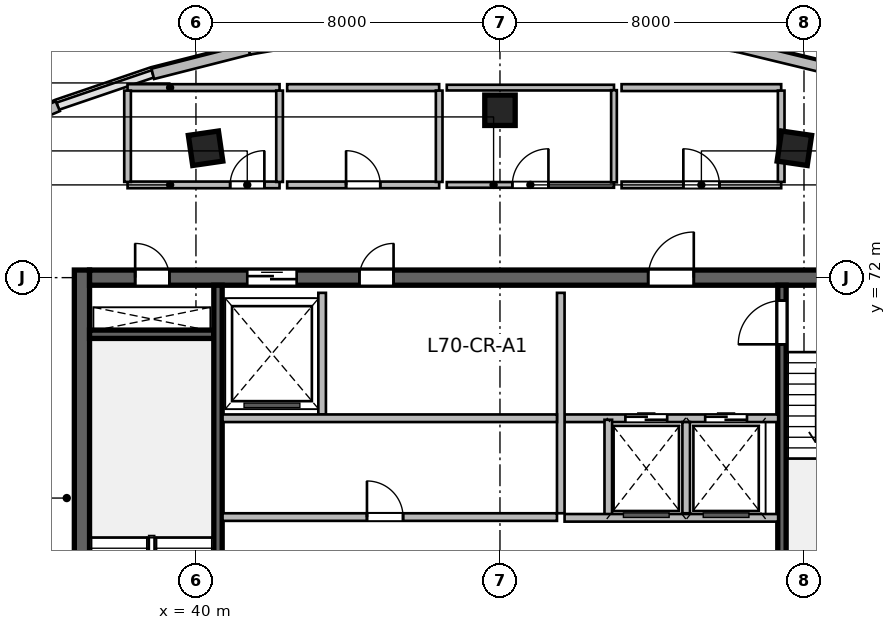
"""IFC4 building model, lengths in metres.
Left out: names, types, materials, properties, quantities, classifications, styles, units other than length and angle.
Written with IfcOpenShell. Run it as: python <this file> out.ifc"""

import sys

from ifc_helpers import new_model, si_unit, direction, frame, frame_2d, origin, origin_2d, place, context, subcontext, project, spatial, rectangle, extrude, source, transform, mapped, element, fill, save


model = new_model("IFC4")
c1 = context("Model", 3, precision=1e-05, world=origin(), true_north=direction((0.0, 1.0)))
c2 = subcontext(c1, "Body", "Model", "MODEL_VIEW")
j1 = project(units=[si_unit("LENGTHUNIT", "METRE"), si_unit("PLANEANGLEUNIT", "RADIAN")], contexts=[c1])
p1 = place(None, origin())
s1 = spatial("IfcSite", under=j1, at=p1, CompositionType="ELEMENT")
p2 = place(p1, origin())
s2 = spatial("IfcBuilding", under=s1, at=p2, CompositionType="ELEMENT")
p3 = place(p2, frame((0.0, 0.0, 287.4)))
s3 = spatial("IfcBuildingStorey", under=s2, at=p3, CompositionType="ELEMENT", Elevation=287.4)
m1 = source(origin(), c2, "Body", "SweptSolid", [
    extrude(rectangle(XDim=12.0, YDim=0.4, at=frame_2d((6.0, 0.0))), origin(), (0.0, 0.0, 1.0), 3.9),
])
p4 = place(p3, frame((37.0, 60.2, 0.0), z_axis=(0.0, 0.0, 1.0), x_axis=(0.0, 1.0, 0.0)))
e1 = element("IfcWall", 1, at=p4, inside=s3, PredefinedType="SHEAR", context=c2, shape_type="MappedRepresentation", body=[
    mapped(m1, transform((0.0, 0.0, 0.0), scale=1.0)),
])
m2 = source(origin(), c2, "Body", "SweptSolid", [
    extrude(rectangle(XDim=21.6, YDim=0.4, at=frame_2d((10.8, 0.0))), origin(), (0.0, 0.0, 1.0), 3.9),
])
p5 = place(p3, frame((37.2, 72.0, 0.0), z_axis=(0.0, 0.0, 1.0), x_axis=(1.0, 0.0, 0.0)))
e2 = element("IfcWall", 2, at=p5, inside=s3, PredefinedType="SHEAR", context=c2, shape_type="MappedRepresentation", body=[
    mapped(m2, transform((0.0, 0.0, 0.0), scale=1.0)),
])
p6 = place(p5, frame((1.2, 0.0, 0.0)))
e3 = element("IfcOpeningElement", 3, at=p6, cuts=e2, PredefinedType="OPENING", context=c2, shape_type="SweptSolid", body=[
    extrude(rectangle(XDim=0.9, YDim=2.1, at=frame_2d((0.45, 1.05))), frame((0.0, 0.21, 0.0), z_axis=(0.0, -1.0, 0.0), x_axis=(1.0, 0.0, 0.0)), (0.0, 0.0, 1.0), 0.42),
])
p7 = place(p5, frame((14.7, 0.0, 0.0)))
e4 = element("IfcOpeningElement", 4, at=p7, cuts=e2, PredefinedType="OPENING", context=c2, shape_type="SweptSolid", body=[
    extrude(rectangle(XDim=1.2, YDim=2.15, at=frame_2d((0.6, 1.075))), frame((0.0, 0.21, 0.0), z_axis=(0.0, -1.0, 0.0), x_axis=(1.0, 0.0, 0.0)), (0.0, 0.0, 1.0), 0.42),
])
p8 = place(p5, frame((4.15, 0.0, 0.0)))
e5 = element("IfcOpeningElement", 5, at=p8, cuts=e2, PredefinedType="OPENING", context=c2, shape_type="SweptSolid", body=[
    extrude(rectangle(XDim=1.3, YDim=2.15, at=frame_2d((0.65, 1.075))), frame((0.0, 0.21, 0.0), z_axis=(0.0, -1.0, 0.0), x_axis=(1.0, 0.0, 0.0)), (0.0, 0.0, 1.0), 0.42),
])
p9 = place(p5, frame((7.1, 0.0, 0.0)))
e6 = element("IfcOpeningElement", 6, at=p9, cuts=e2, PredefinedType="OPENING", context=c2, shape_type="SweptSolid", body=[
    extrude(rectangle(XDim=0.9, YDim=2.1, at=frame_2d((0.45, 1.05))), frame((0.0, 0.21, 0.0), z_axis=(0.0, -1.0, 0.0), x_axis=(1.0, 0.0, 0.0)), (0.0, 0.0, 1.0), 0.42),
])
m3 = source(origin(), c2, "Body", "SweptSolid", [
    extrude(rectangle(XDim=3.27, YDim=0.22, at=frame_2d((1.635, 0.0))), origin(), (0.0, 0.0, 1.0), 3.9),
])
p10 = place(p3, frame((37.2, 70.51, 0.0), z_axis=(0.0, 0.0, 1.0), x_axis=(1.0, 0.0, 0.0)))
e7 = element("IfcWall", 7, at=p10, inside=s3, PredefinedType="SHEAR", context=c2, shape_type="MappedRepresentation", body=[
    mapped(m3, transform((0.0, 0.0, 0.0), scale=1.0)),
])
m4 = source(origin(), c2, "Body", "SweptSolid", [
    extrude(rectangle(XDim=11.2, YDim=0.22, at=frame_2d((5.6, 0.0))), origin(), (0.0, 0.0, 1.0), 3.9),
])
p11 = place(p3, frame((40.58, 60.6, 0.0), z_axis=(0.0, 0.0, 1.0), x_axis=(0.0, 1.0, 0.0)))
e8 = element("IfcWall", 8, at=p11, inside=s3, PredefinedType="SHEAR", context=c2, shape_type="MappedRepresentation", body=[
    mapped(m4, transform((0.0, 0.0, 0.0), scale=1.0)),
])
p12 = place(p3, frame((55.42, 60.6, 0.0), z_axis=(0.0, 0.0, 1.0), x_axis=(0.0, 1.0, 0.0)))
e9 = element("IfcWall", 9, at=p12, inside=s3, PredefinedType="SHEAR", context=c2, shape_type="MappedRepresentation", body=[
    mapped(m4, transform((0.0, 0.0, 0.0), scale=1.0)),
])
p13 = place(p12, frame((9.645, 0.0, 0.0)))
e10 = element("IfcOpeningElement", 10, at=p13, cuts=e9, PredefinedType="OPENING", context=c2, shape_type="SweptSolid", body=[
    extrude(rectangle(XDim=1.15, YDim=2.15, at=frame_2d((0.575, 1.075))), frame((0.0, 0.12, 0.0), z_axis=(0.0, -1.0, 0.0), x_axis=(1.0, 0.0, 0.0)), (0.0, 0.0, 1.0), 0.24),
])
m5 = source(origin(), c2, "Body", "SweptSolid", [
    extrude(rectangle(XDim=0.8, YDim=0.8, at=origin_2d()), origin(), (0.0, 0.0, 1.0), 3.9),
])
for number, where, z_axis, x_axis in (
    (11, (40.253, 75.404, 0.0), (0.0, 0.0, 1.0), (-0.143, 0.99, 0.0)),
    (12, (48.0, 76.404, 0.0), (0.0, 0.0, 1.0), (0.0, 1.0, 0.0)),
    (13, (55.747, 75.404, 0.0), (0.0, 0.0, 1.0), (0.143, 0.99, 0.0)),
):
    element("IfcColumn", number, at=place(p3, frame(where, z_axis=z_axis, x_axis=x_axis)), inside=s3, PredefinedType="COLUMN", context=c2, shape_type="MappedRepresentation", body=[
        mapped(m5, transform((0.0, 0.0, 0.0), scale=1.0)),
    ])
m6 = source(origin(), c2, "Body", "SweptSolid", [
    extrude(rectangle(XDim=2.673, YDim=0.28, at=frame_2d((1.337, 0.0))), origin(), (0.0, 0.0, 1.0), 3.64),
])
p14 = place(p3, frame((33.907, 75.458, 0.0), z_axis=(0.0, 0.0, 1.0), x_axis=(0.919036345912, 0.394172798266, 0.0)))
e14 = element("IfcWall", 14, at=p14, inside=s3, PredefinedType="SOLIDWALL", context=c2, shape_type="MappedRepresentation", body=[
    mapped(m6, transform((0.0, 0.0, 0.0), scale=1.0)),
])
m7 = source(origin(), c2, "Body", "SweptSolid", [
    extrude(rectangle(XDim=2.614, YDim=0.28, at=frame_2d((1.307, 0.0))), origin(), (0.0, 0.0, 1.0), 3.64),
])
p15 = place(p3, frame((38.863, 77.362, 0.0), z_axis=(0.0, 0.0, 1.0), x_axis=(0.969106509315, 0.246642602978, 0.0)))
e15 = element("IfcWall", 15, at=p15, inside=s3, PredefinedType="SOLIDWALL", context=c2, shape_type="MappedRepresentation", body=[
    mapped(m7, transform((0.0, 0.0, 0.0), scale=1.0)),
])
m8 = source(origin(), c2, "Body", "SweptSolid", [
    extrude(rectangle(XDim=2.594, YDim=0.28, at=frame_2d((1.297, 0.0))), origin(), (0.0, 0.0, 1.0), 3.64),
])
p16 = place(p3, frame((41.397, 78.007, 0.0), z_axis=(0.0, 0.0, 1.0), x_axis=(0.985792341502, 0.167968626344, 0.0)))
e16 = element("IfcWall", 16, at=p16, inside=s3, PredefinedType="SOLIDWALL", context=c2, shape_type="MappedRepresentation", body=[
    mapped(m8, transform((0.0, 0.0, 0.0), scale=1.0)),
])
m9 = source(origin(), c2, "Body", "SweptSolid", [
    extrude(rectangle(XDim=2.611, YDim=0.28, at=frame_2d((1.305, 0.0))), origin(), (0.0, 0.0, 1.0), 3.64),
])
p17 = place(p3, frame((54.239, 78.082, 0.0), z_axis=(0.0, 0.0, 1.0), x_axis=(0.97188253817, -0.235466201396, 0.0)))
e17 = element("IfcWall", 17, at=p17, inside=s3, PredefinedType="SOLIDWALL", context=c2, shape_type="MappedRepresentation", body=[
    mapped(m9, transform((0.0, 0.0, 0.0), scale=1.0)),
])
m10 = source(origin(), c2, "Body", "SweptSolid", [
    extrude(rectangle(XDim=5.62, YDim=0.2, at=frame_2d((2.81, 0.0))), origin(), (0.0, 0.0, 1.0), 3.64),
])
p18 = place(p3, frame((49.7, 68.3, 0.0), z_axis=(0.0, 0.0, 1.0), x_axis=(1.0, 0.0, 0.0)))
e18 = element("IfcWall", 18, at=p18, inside=s3, PredefinedType="SOLIDWALL", context=c2, shape_type="MappedRepresentation", body=[
    mapped(m10, transform((0.0, 0.0, 0.0), scale=1.0)),
])
p19 = place(p18, frame((1.6, 0.0, 0.0)))
e19 = element("IfcOpeningElement", 19, at=p19, cuts=e18, PredefinedType="OPENING", context=c2, shape_type="SweptSolid", body=[
    extrude(rectangle(XDim=1.1, YDim=2.15, at=frame_2d((0.55, 1.075))), frame((0.0, 0.11, 0.0), z_axis=(0.0, -1.0, 0.0), x_axis=(1.0, 0.0, 0.0)), (0.0, 0.0, 1.0), 0.22),
])
p20 = place(p18, frame((3.7, 0.0, 0.0)))
e20 = element("IfcOpeningElement", 20, at=p20, cuts=e18, PredefinedType="OPENING", context=c2, shape_type="SweptSolid", body=[
    extrude(rectangle(XDim=1.1, YDim=2.15, at=frame_2d((0.55, 1.075))), frame((0.0, 0.11, 0.0), z_axis=(0.0, -1.0, 0.0), x_axis=(1.0, 0.0, 0.0)), (0.0, 0.0, 1.0), 0.22),
])
m11 = source(origin(), c2, "Body", "SweptSolid", [
    extrude(rectangle(XDim=5.8, YDim=0.2, at=frame_2d((2.9, 0.0))), origin(), (0.0, 0.0, 1.0), 3.64),
])
p21 = place(p3, frame((49.6, 65.8, 0.0), z_axis=(0.0, 0.0, 1.0), x_axis=(0.0, 1.0, 0.0)))
e21 = element("IfcWall", 21, at=p21, inside=s3, PredefinedType="SOLIDWALL", context=c2, shape_type="MappedRepresentation", body=[
    mapped(m11, transform((0.0, 0.0, 0.0), scale=1.0)),
])
m12 = source(origin(), c2, "Body", "SweptSolid", [
    extrude(rectangle(XDim=2.58, YDim=0.2, at=frame_2d((1.29, 0.0))), origin(), (0.0, 0.0, 1.0), 3.64),
])
p22 = place(p3, frame((50.85, 65.68, 0.0), z_axis=(0.0, 0.0, 1.0), x_axis=(0.0, 1.0, 0.0)))
e22 = element("IfcWall", 22, at=p22, inside=s3, PredefinedType="SOLIDWALL", context=c2, shape_type="MappedRepresentation", body=[
    mapped(m12, transform((0.0, 0.0, 0.0), scale=1.0)),
])
m13 = source(origin(), c2, "Body", "SweptSolid", [
    extrude(rectangle(XDim=2.4, YDim=0.2, at=frame_2d((1.2, 0.0))), origin(), (0.0, 0.0, 1.0), 3.64),
])
p23 = place(p3, frame((52.9, 65.8, 0.0), z_axis=(0.0, 0.0, 1.0), x_axis=(0.0, 1.0, 0.0)))
e23 = element("IfcWall", 23, at=p23, inside=s3, PredefinedType="SOLIDWALL", context=c2, shape_type="MappedRepresentation", body=[
    mapped(m13, transform((0.0, 0.0, 0.0), scale=1.0)),
])
p24 = place(p3, frame((49.7, 65.68, 0.0), z_axis=(0.0, 0.0, 1.0), x_axis=(1.0, 0.0, 0.0)))
e24 = element("IfcWall", 24, at=p24, inside=s3, PredefinedType="SOLIDWALL", context=c2, shape_type="MappedRepresentation", body=[
    mapped(m10, transform((0.0, 0.0, 0.0), scale=1.0)),
])
m14 = source(origin(), c2, "Body", "SweptSolid", [
    extrude(rectangle(XDim=3.2, YDim=0.2, at=frame_2d((1.6, 0.0))), origin(), (0.0, 0.0, 1.0), 3.64),
])
p25 = place(p3, frame((43.32, 68.4, 0.0), z_axis=(0.0, 0.0, 1.0), x_axis=(0.0, 1.0, 0.0)))
e25 = element("IfcWall", 25, at=p25, inside=s3, PredefinedType="SOLIDWALL", context=c2, shape_type="MappedRepresentation", body=[
    mapped(m14, transform((0.0, 0.0, 0.0), scale=1.0)),
])
m15 = source(origin(), c2, "Body", "SweptSolid", [
    extrude(rectangle(XDim=8.8, YDim=0.2, at=frame_2d((4.4, 0.0))), origin(), (0.0, 0.0, 1.0), 3.64),
])
p26 = place(p3, frame((40.7, 68.3, 0.0), z_axis=(0.0, 0.0, 1.0), x_axis=(1.0, 0.0, 0.0)))
e26 = element("IfcWall", 26, at=p26, inside=s3, PredefinedType="SOLIDWALL", context=c2, shape_type="MappedRepresentation", body=[
    mapped(m15, transform((0.0, 0.0, 0.0), scale=1.0)),
])
p27 = place(p3, frame((40.7, 65.7, 0.0), z_axis=(0.0, 0.0, 1.0), x_axis=(1.0, 0.0, 0.0)))
e27 = element("IfcWall", 27, at=p27, inside=s3, PredefinedType="SOLIDWALL", context=c2, shape_type="MappedRepresentation", body=[
    mapped(m15, transform((0.0, 0.0, 0.0), scale=1.0)),
])
p28 = place(p27, frame((3.8, 0.0, 0.0)))
e28 = element("IfcOpeningElement", 28, at=p28, cuts=e27, PredefinedType="OPENING", context=c2, shape_type="SweptSolid", body=[
    extrude(rectangle(XDim=0.95, YDim=2.15, at=frame_2d((0.475, 1.075))), frame((0.0, 0.11, 0.0), z_axis=(0.0, -1.0, 0.0), x_axis=(1.0, 0.0, 0.0)), (0.0, 0.0, 1.0), 0.22),
])
m16 = source(origin(), c2, "Body", "SweptSolid", [
    extrude(rectangle(XDim=4.0, YDim=0.175, at=frame_2d((2.0, 0.0))), origin(), (0.0, 0.0, 1.0), 3.64),
])
p29 = place(p3, frame((38.2, 74.44, 0.0), z_axis=(0.0, 0.0, 1.0), x_axis=(1.0, 0.0, 0.0)))
e29 = element("IfcWall", 29, at=p29, inside=s3, PredefinedType="PARTITIONING", context=c2, shape_type="MappedRepresentation", body=[
    mapped(m16, transform((0.0, 0.0, 0.0), scale=1.0)),
])
p30 = place(p29, frame((2.7, 0.0, 0.0)))
e30 = element("IfcOpeningElement", 30, at=p30, cuts=e29, PredefinedType="OPENING", context=c2, shape_type="SweptSolid", body=[
    extrude(rectangle(XDim=0.9, YDim=2.08, at=frame_2d((0.45, 1.04))), frame((0.0, 0.098, 0.0), z_axis=(0.0, -1.0, 0.0), x_axis=(1.0, 0.0, 0.0)), (0.0, 0.0, 1.0), 0.195),
])
m17 = source(origin(), c2, "Body", "SweptSolid", [
    extrude(rectangle(XDim=4.0, YDim=0.18, at=frame_2d((2.0, 0.0))), origin(), (0.0, 0.0, 1.0), 3.64),
])
p31 = place(p3, frame((38.2, 77.0, 0.0), z_axis=(0.0, 0.0, 1.0), x_axis=(1.0, 0.0, 0.0)))
e31 = element("IfcWall", 31, at=p31, inside=s3, PredefinedType="PLUMBINGWALL", context=c2, shape_type="MappedRepresentation", body=[
    mapped(m17, transform((0.0, 0.0, 0.0), scale=1.0)),
])
m18 = source(origin(), c2, "Body", "SweptSolid", [
    extrude(rectangle(XDim=2.403, YDim=0.175, at=frame_2d((1.201, 0.0))), origin(), (0.0, 0.0, 1.0), 3.64),
])
for number, where, z_axis, x_axis in (
    (32, (38.2, 74.519, 0.0), (0.0, 0.0, 1.0), (0.0, 1.0, 0.0)),
    (33, (42.2, 74.519, 0.0), (0.0, 0.0, 1.0), (0.0, 1.0, 0.0)),
):
    element("IfcWall", number, at=place(p3, frame(where, z_axis=z_axis, x_axis=x_axis)), inside=s3, PredefinedType="PARTITIONING", context=c2, shape_type="MappedRepresentation", body=[
        mapped(m18, transform((0.0, 0.0, 0.0), scale=1.0)),
    ])
p32 = place(p3, frame((42.4, 74.44, 0.0), z_axis=(0.0, 0.0, 1.0), x_axis=(1.0, 0.0, 0.0)))
e34 = element("IfcWall", 34, at=p32, inside=s3, PredefinedType="PARTITIONING", context=c2, shape_type="MappedRepresentation", body=[
    mapped(m16, transform((0.0, 0.0, 0.0), scale=1.0)),
])
p33 = place(p32, frame((1.55, 0.0, 0.0)))
e35 = element("IfcOpeningElement", 35, at=p33, cuts=e34, PredefinedType="OPENING", context=c2, shape_type="SweptSolid", body=[
    extrude(rectangle(XDim=0.9, YDim=2.08, at=frame_2d((0.45, 1.04))), frame((0.0, 0.098, 0.0), z_axis=(0.0, -1.0, 0.0), x_axis=(1.0, 0.0, 0.0)), (0.0, 0.0, 1.0), 0.195),
])
p34 = place(p3, frame((42.4, 77.0, 0.0), z_axis=(0.0, 0.0, 1.0), x_axis=(1.0, 0.0, 0.0)))
e36 = element("IfcWall", 36, at=p34, inside=s3, PredefinedType="PLUMBINGWALL", context=c2, shape_type="MappedRepresentation", body=[
    mapped(m17, transform((0.0, 0.0, 0.0), scale=1.0)),
])
p35 = place(p3, frame((46.4, 74.519, 0.0), z_axis=(0.0, 0.0, 1.0), x_axis=(0.0, 1.0, 0.0)))
e37 = element("IfcWall", 37, at=p35, inside=s3, PredefinedType="PARTITIONING", context=c2, shape_type="MappedRepresentation", body=[
    mapped(m18, transform((0.0, 0.0, 0.0), scale=1.0)),
])
m19 = source(origin(), c2, "Body", "SweptSolid", [
    extrude(rectangle(XDim=4.4, YDim=0.15, at=frame_2d((2.2, 0.0))), origin(), (0.0, 0.0, 1.0), 3.64),
])
p36 = place(p3, frame((46.6, 74.44, 0.0), z_axis=(0.0, 0.0, 1.0), x_axis=(1.0, 0.0, 0.0)))
e38 = element("IfcWall", 38, at=p36, inside=s3, PredefinedType="PARTITIONING", context=c2, shape_type="MappedRepresentation", body=[
    mapped(m19, transform((0.0, 0.0, 0.0), scale=1.0)),
])
p37 = place(p36, frame((1.725, 0.0, 0.0)))
e39 = element("IfcOpeningElement", 39, at=p37, cuts=e38, PredefinedType="OPENING", context=c2, shape_type="SweptSolid", body=[
    extrude(rectangle(XDim=0.95, YDim=2.1, at=frame_2d((0.475, 1.05))), frame((0.0, 0.085, 0.0), z_axis=(0.0, -1.0, 0.0), x_axis=(1.0, 0.0, 0.0)), (0.0, 0.0, 1.0), 0.17),
])
p38 = place(p3, frame((46.6, 77.0, 0.0), z_axis=(0.0, 0.0, 1.0), x_axis=(1.0, 0.0, 0.0)))
e40 = element("IfcWall", 40, at=p38, inside=s3, PredefinedType="PARTITIONING", context=c2, shape_type="MappedRepresentation", body=[
    mapped(m19, transform((0.0, 0.0, 0.0), scale=1.0)),
])
m20 = source(origin(), c2, "Body", "SweptSolid", [
    extrude(rectangle(XDim=2.425, YDim=0.15, at=frame_2d((1.212, 0.0))), origin(), (0.0, 0.0, 1.0), 3.64),
])
p39 = place(p3, frame((51.0, 74.508, 0.0), z_axis=(0.0, 0.0, 1.0), x_axis=(0.0, 1.0, 0.0)))
e41 = element("IfcWall", 41, at=p39, inside=s3, PredefinedType="PARTITIONING", context=c2, shape_type="MappedRepresentation", body=[
    mapped(m20, transform((0.0, 0.0, 0.0), scale=1.0)),
])
m21 = source(origin(), c2, "Body", "SweptSolid", [
    extrude(rectangle(XDim=4.2, YDim=0.175, at=frame_2d((2.1, 0.0))), origin(), (0.0, 0.0, 1.0), 3.64),
])
p40 = place(p3, frame((51.2, 74.44, 0.0), z_axis=(0.0, 0.0, 1.0), x_axis=(1.0, 0.0, 0.0)))
e42 = element("IfcWall", 42, at=p40, inside=s3, PredefinedType="PARTITIONING", context=c2, shape_type="MappedRepresentation", body=[
    mapped(m21, transform((0.0, 0.0, 0.0), scale=1.0)),
])
p41 = place(p40, frame((1.625, 0.0, 0.0)))
e43 = element("IfcOpeningElement", 43, at=p41, cuts=e42, PredefinedType="OPENING", context=c2, shape_type="SweptSolid", body=[
    extrude(rectangle(XDim=0.95, YDim=2.12, at=frame_2d((0.475, 1.06))), frame((0.0, 0.098, 0.0), z_axis=(0.0, -1.0, 0.0), x_axis=(1.0, 0.0, 0.0)), (0.0, 0.0, 1.0), 0.195),
])
m22 = source(origin(), c2, "Body", "SweptSolid", [
    extrude(rectangle(XDim=4.2, YDim=0.18, at=frame_2d((2.1, 0.0))), origin(), (0.0, 0.0, 1.0), 3.64),
])
p42 = place(p3, frame((51.2, 77.0, 0.0), z_axis=(0.0, 0.0, 1.0), x_axis=(1.0, 0.0, 0.0)))
e44 = element("IfcWall", 44, at=p42, inside=s3, PredefinedType="PLUMBINGWALL", context=c2, shape_type="MappedRepresentation", body=[
    mapped(m22, transform((0.0, 0.0, 0.0), scale=1.0)),
])
p43 = place(p3, frame((55.4, 74.519, 0.0), z_axis=(0.0, 0.0, 1.0), x_axis=(0.0, 1.0, 0.0)))
e45 = element("IfcWall", 45, at=p43, inside=s3, PredefinedType="PARTITIONING", context=c2, shape_type="MappedRepresentation", body=[
    mapped(m18, transform((0.0, 0.0, 0.0), scale=1.0)),
])
m23 = source(origin(), c2, "Body", "SweptSolid", [
    extrude(rectangle(XDim=12.311, YDim=0.195, at=frame_2d((6.155, 0.0))), origin(), (0.0, 0.0, 1.0), 3.64),
])
p44 = place(p3, frame((36.5, 63.216, 0.0), z_axis=(0.0, 0.0, 1.0), x_axis=(-0.268759602651, 0.963207286093, 0.0)))
e46 = element("IfcWall", 46, at=p44, inside=s3, PredefinedType="PARTITIONING", context=c2, shape_type="MappedRepresentation", body=[
    mapped(m23, transform((0.0, 0.0, 0.0), scale=1.0)),
])
m24 = source(origin(), c2, "Body", "SweptSolid", [
    extrude(rectangle(XDim=0.9, YDim=2.1, at=frame_2d((0.45, 1.05))), frame((0.0, 0.025, 0.0), z_axis=(0.0, -1.0, 0.0), x_axis=(1.0, 0.0, 0.0)), (0.0, 0.0, 1.0), 0.05),
])
p45 = place(p6, origin())
e47 = element("IfcDoor", 47, at=p45, inside=s3, OperationType="SINGLE_SWING_LEFT", PredefinedType="DOOR", context=c2, shape_type="MappedRepresentation", body=[
    mapped(m24, transform((0.0, 0.0, 0.0), scale=1.0)),
])
fill(e3, e47)
m25 = source(origin(), c2, "Body", "SweptSolid", [
    extrude(rectangle(XDim=1.15, YDim=2.15, at=frame_2d((0.575, 1.075))), frame((0.0, 0.025, 0.0), z_axis=(0.0, -1.0, 0.0), x_axis=(1.0, 0.0, 0.0)), (0.0, 0.0, 1.0), 0.05),
])
p46 = place(p13, origin())
e48 = element("IfcDoor", 48, at=p46, inside=s3, OperationType="SINGLE_SWING_LEFT", PredefinedType="DOOR", context=c2, shape_type="MappedRepresentation", body=[
    mapped(m25, transform((0.0, 0.0, 0.0), scale=1.0)),
])
fill(e10, e48)
m26 = source(origin(), c2, "Body", "SweptSolid", [
    extrude(rectangle(XDim=1.2, YDim=2.15, at=frame_2d((0.6, 1.075))), frame((0.0, 0.025, 0.0), z_axis=(0.0, -1.0, 0.0), x_axis=(1.0, 0.0, 0.0)), (0.0, 0.0, 1.0), 0.05),
])
p47 = place(p7, origin())
e49 = element("IfcDoor", 49, at=p47, inside=s3, OperationType="SINGLE_SWING_RIGHT", PredefinedType="DOOR", context=c2, shape_type="MappedRepresentation", body=[
    mapped(m26, transform((0.0, 0.0, 0.0), scale=1.0)),
])
fill(e4, e49)
m27 = source(origin(), c2, "Body", "SweptSolid", [
    extrude(rectangle(XDim=1.1, YDim=2.15, at=frame_2d((0.55, 1.075))), frame((0.0, 0.025, 0.0), z_axis=(0.0, -1.0, 0.0), x_axis=(1.0, 0.0, 0.0)), (0.0, 0.0, 1.0), 0.05),
])
p48 = place(p19, origin())
e50 = element("IfcDoor", 50, at=p48, inside=s3, OperationType="DOUBLE_DOOR_SLIDING", PredefinedType="DOOR", context=c2, shape_type="MappedRepresentation", body=[
    mapped(m27, transform((0.0, 0.0, 0.0), scale=1.0)),
])
fill(e19, e50)
p49 = place(p20, origin())
e51 = element("IfcDoor", 51, at=p49, inside=s3, OperationType="DOUBLE_DOOR_SLIDING", PredefinedType="DOOR", context=c2, shape_type="MappedRepresentation", body=[
    mapped(m27, transform((0.0, 0.0, 0.0), scale=1.0)),
])
fill(e20, e51)
m28 = source(origin(), c2, "Body", "SweptSolid", [
    extrude(rectangle(XDim=1.3, YDim=2.15, at=frame_2d((0.65, 1.075))), frame((0.0, 0.025, 0.0), z_axis=(0.0, -1.0, 0.0), x_axis=(1.0, 0.0, 0.0)), (0.0, 0.0, 1.0), 0.05),
])
p50 = place(p8, origin())
e52 = element("IfcDoor", 52, at=p50, inside=s3, OperationType="DOUBLE_DOOR_SLIDING", PredefinedType="DOOR", context=c2, shape_type="MappedRepresentation", body=[
    mapped(m28, transform((0.0, 0.0, 0.0), scale=1.0)),
])
fill(e5, e52)
p51 = place(p9, origin())
e53 = element("IfcDoor", 53, at=p51, inside=s3, OperationType="SINGLE_SWING_RIGHT", PredefinedType="DOOR", context=c2, shape_type="MappedRepresentation", body=[
    mapped(m24, transform((0.0, 0.0, 0.0), scale=1.0)),
])
fill(e6, e53)
m29 = source(origin(), c2, "Body", "SweptSolid", [
    extrude(rectangle(XDim=0.95, YDim=2.15, at=frame_2d((0.475, 1.075))), frame((0.0, 0.025, 0.0), z_axis=(0.0, -1.0, 0.0), x_axis=(1.0, 0.0, 0.0)), (0.0, 0.0, 1.0), 0.05),
])
p52 = place(p28, origin())
e54 = element("IfcDoor", 54, at=p52, inside=s3, OperationType="SINGLE_SWING_LEFT", PredefinedType="DOOR", context=c2, shape_type="MappedRepresentation", body=[
    mapped(m29, transform((0.0, 0.0, 0.0), scale=1.0)),
])
fill(e28, e54)
m30 = source(origin(), c2, "Body", "SweptSolid", [
    extrude(rectangle(XDim=0.9, YDim=2.08, at=frame_2d((0.45, 1.04))), frame((0.0, 0.025, 0.0), z_axis=(0.0, -1.0, 0.0), x_axis=(1.0, 0.0, 0.0)), (0.0, 0.0, 1.0), 0.05),
])
p53 = place(p30, origin())
e55 = element("IfcDoor", 55, at=p53, inside=s3, OperationType="SINGLE_SWING_RIGHT", PredefinedType="DOOR", context=c2, shape_type="MappedRepresentation", body=[
    mapped(m30, transform((0.0, 0.0, 0.0), scale=1.0)),
])
fill(e30, e55)
p54 = place(p33, origin())
e56 = element("IfcDoor", 56, at=p54, inside=s3, OperationType="SINGLE_SWING_LEFT", PredefinedType="DOOR", context=c2, shape_type="MappedRepresentation", body=[
    mapped(m30, transform((0.0, 0.0, 0.0), scale=1.0)),
])
fill(e35, e56)
m31 = source(origin(), c2, "Body", "SweptSolid", [
    extrude(rectangle(XDim=0.95, YDim=2.1, at=frame_2d((0.475, 1.05))), frame((0.0, 0.025, 0.0), z_axis=(0.0, -1.0, 0.0), x_axis=(1.0, 0.0, 0.0)), (0.0, 0.0, 1.0), 0.05),
])
p55 = place(p37, origin())
e57 = element("IfcDoor", 57, at=p55, inside=s3, OperationType="SINGLE_SWING_RIGHT", PredefinedType="DOOR", context=c2, shape_type="MappedRepresentation", body=[
    mapped(m31, transform((0.0, 0.0, 0.0), scale=1.0)),
])
fill(e39, e57)
m32 = source(origin(), c2, "Body", "SweptSolid", [
    extrude(rectangle(XDim=0.95, YDim=2.12, at=frame_2d((0.475, 1.06))), frame((0.0, 0.025, 0.0), z_axis=(0.0, -1.0, 0.0), x_axis=(1.0, 0.0, 0.0)), (0.0, 0.0, 1.0), 0.05),
])
p56 = place(p41, origin())
e58 = element("IfcDoor", 58, at=p56, inside=s3, OperationType="SINGLE_SWING_LEFT", PredefinedType="DOOR", context=c2, shape_type="MappedRepresentation", body=[
    mapped(m32, transform((0.0, 0.0, 0.0), scale=1.0)),
])
fill(e43, e58)
save(model, sys.argv[1])
